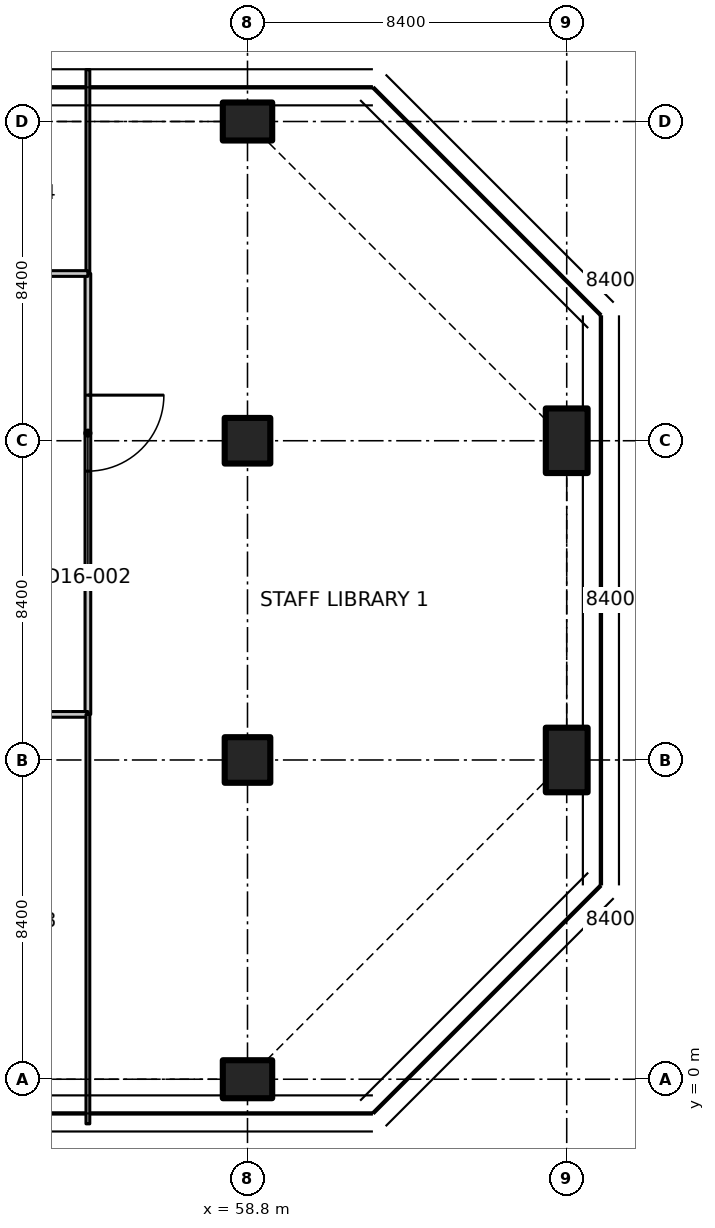
"""IFC4 building model, lengths in metres.
Left out: names, types, materials, properties, quantities, classifications, styles, units other than length and angle.
Written with IfcOpenShell. Run it as: python <this file> out.ifc"""

import sys

from ifc_helpers import new_model, si_unit, direction, frame, frame_2d, origin, origin_2d, place, context, subcontext, project, spatial, polyline, rectangle, outline, extrude, element, fill, save


model = new_model("IFC4")
c1 = context("Model", 3, precision=1e-05, world=origin(), true_north=direction((0.0, 1.0)))
c2 = subcontext(c1, "Body", "Model", "MODEL_VIEW")
j1 = project(units=[si_unit("LENGTHUNIT", "METRE"), si_unit("PLANEANGLEUNIT", "RADIAN")], contexts=[c1])
p1 = place(None, origin())
s1 = spatial("IfcSite", under=j1, at=p1, CompositionType="ELEMENT")
p2 = place(p1, origin())
s2 = spatial("IfcBuilding", under=s1, at=p2, CompositionType="ELEMENT")
p3 = place(p2, frame((0.0, 0.0, 127.7)))
s3 = spatial("IfcBuildingStorey", under=s2, at=p3, CompositionType="ELEMENT", Elevation=127.7)
p4 = place(p3, frame((58.8, 0.0, 0.0), z_axis=(0.0, 0.0, 1.0), x_axis=(0.0, 1.0, 0.0)))
e1 = element("IfcColumn", 1, at=p4, inside=s3, PredefinedType="COLUMN", context=c2, shape_type="SweptSolid", body=[
    extrude(rectangle(XDim=1.0, YDim=1.3, at=origin_2d()), origin(), (0.0, 0.0, 1.0), 3.35),
])
for number, where, z_axis, x_axis in (
    (2, (58.8, 8.4, 0.0), (0.0, 0.0, 1.0), (1.0, 0.0, 0.0)),
    (3, (58.8, 16.8, 0.0), (0.0, 0.0, 1.0), (1.0, 0.0, 0.0)),
):
    element("IfcColumn", number, at=place(p3, frame(where, z_axis=z_axis, x_axis=x_axis)), inside=s3, PredefinedType="COLUMN", context=c2, shape_type="SweptSolid", body=[
        extrude(rectangle(XDim=1.2, YDim=1.2, at=origin_2d()), origin(), (0.0, 0.0, 1.0), 3.35),
    ])
p5 = place(p3, frame((58.8, 25.2, 0.0), z_axis=(0.0, 0.0, 1.0), x_axis=(0.0, 1.0, 0.0)))
e4 = element("IfcColumn", 4, at=p5, inside=s3, PredefinedType="COLUMN", context=c2, shape_type="SweptSolid", body=[
    extrude(rectangle(XDim=1.0, YDim=1.3, at=origin_2d()), origin(), (0.0, 0.0, 1.0), 3.35),
])
for number, where, z_axis, x_axis in (
    (5, (67.2, 8.4, 0.0), (0.0, 0.0, 1.0), (1.0, 0.0, 0.0)),
    (6, (67.2, 16.8, 0.0), (0.0, 0.0, 1.0), (1.0, 0.0, 0.0)),
):
    element("IfcColumn", number, at=place(p3, frame(where, z_axis=z_axis, x_axis=x_axis)), inside=s3, PredefinedType="COLUMN", context=c2, shape_type="SweptSolid", body=[
        extrude(rectangle(XDim=1.1, YDim=1.7, at=origin_2d()), origin(), (0.0, 0.0, 1.0), 3.35),
    ])
p6 = place(p3, frame((54.6, 13.0, 0.0), z_axis=(0.0, 0.0, 1.0), x_axis=(0.0, -1.0, 0.0)))
e7 = element("IfcWall", 7, at=p6, inside=s3, PredefinedType="PARTITIONING", context=c2, shape_type="SweptSolid", body=[
    extrude(rectangle(XDim=3.4, YDim=0.15, at=frame_2d((1.7, 0.0))), origin(), (0.0, 0.0, 1.0), 3.33),
])
p7 = place(p3, frame((54.6, 9.6, 0.0), z_axis=(0.0, 0.0, 1.0), x_axis=(-1.0, 0.0, 0.0)))
e8 = element("IfcWall", 8, at=p7, inside=s3, PredefinedType="PARTITIONING", context=c2, shape_type="SweptSolid", body=[
    extrude(rectangle(XDim=4.2, YDim=0.15, at=frame_2d((2.1, 0.0))), origin(), (0.0, 0.0, 1.0), 3.33),
])
p8 = place(p7, frame((1.5, 0.0, 0.0)))
e9 = element("IfcOpeningElement", 9, at=p8, cuts=e8, PredefinedType="OPENING", context=c2, shape_type="SweptSolid", body=[
    extrude(rectangle(XDim=1.1, YDim=2.1, at=frame_2d((0.55, 1.05))), frame((0.0, 0.085, 0.0), z_axis=(0.0, -1.0, 0.0), x_axis=(1.0, 0.0, 0.0)), (0.0, 0.0, 1.0), 0.17),
])
p9 = place(p3, frame((54.6, 21.2, 0.0), z_axis=(0.0, 0.0, 1.0), x_axis=(0.0, -1.0, 0.0)))
e10 = element("IfcWall", 10, at=p9, inside=s3, PredefinedType="PARTITIONING", context=c2, shape_type="SweptSolid", body=[
    extrude(rectangle(XDim=8.2, YDim=0.15, at=frame_2d((4.1, 0.0))), origin(), (0.0, 0.0, 1.0), 3.33),
])
p10 = place(p9, frame((3.2, 0.0, 0.0)))
e11 = element("IfcOpeningElement", 11, at=p10, cuts=e10, PredefinedType="OPENING", context=c2, shape_type="SweptSolid", body=[
    extrude(rectangle(XDim=2.0, YDim=2.4, at=frame_2d((1.0, 1.2))), frame((0.0, 0.085, 0.0), z_axis=(0.0, -1.0, 0.0), x_axis=(1.0, 0.0, 0.0)), (0.0, 0.0, 1.0), 0.17),
])
p11 = place(p3, frame((54.6, -1.174, 0.0), z_axis=(0.0, 0.0, 1.0), x_axis=(0.0, 1.0, 0.0)))
e12 = element("IfcWall", 12, at=p11, inside=s3, PredefinedType="PARTITIONING", context=c2, shape_type="SweptSolid", body=[
    extrude(outline(polyline([(0.0, 0.0), (10.774, 0.0), (10.774, 3.33), (1.624, 3.33), (1.622, 2.98), (0.726, 2.98), (0.724, 3.33), (0.074, 3.33), (0.0, 3.33), (0.0, 0.0)])), frame((0.0, 0.05, 0.0), z_axis=(0.0, -1.0, 0.0), x_axis=(1.0, 0.0, 0.0)), (0.0, 0.0, 1.0), 0.1),
])
p12 = place(p3, frame((54.6, 21.2, 0.0), z_axis=(0.0, 0.0, 1.0), x_axis=(0.0, 1.0, 0.0)))
e13 = element("IfcWall", 13, at=p12, inside=s3, PredefinedType="PARTITIONING", context=c2, shape_type="SweptSolid", body=[
    extrude(outline(polyline([(0.0, 0.0), (5.365, 0.0), (5.365, 3.33), (5.1, 3.33), (4.45, 3.33), (4.448, 2.98), (3.552, 2.98), (3.55, 3.33), (0.0, 3.33), (0.0, 0.0)])), frame((0.0, 0.05, 0.0), z_axis=(0.0, -1.0, 0.0), x_axis=(1.0, 0.0, 0.0)), (0.0, 0.0, 1.0), 0.1),
])
p13 = place(p3, frame((51.0, 21.2, 0.0), z_axis=(0.0, 0.0, 1.0), x_axis=(1.0, 0.0, 0.0)))
e14 = element("IfcWall", 14, at=p13, inside=s3, PredefinedType="PARTITIONING", context=c2, shape_type="SweptSolid", body=[
    extrude(rectangle(XDim=3.6, YDim=0.15, at=frame_2d((1.8, 0.0))), origin(), (0.0, 0.0, 1.0), 3.33),
])
p14 = place(p13, frame((1.2, 0.0, 0.0)))
e15 = element("IfcOpeningElement", 15, at=p14, cuts=e14, PredefinedType="OPENING", context=c2, shape_type="SweptSolid", body=[
    extrude(rectangle(XDim=1.0, YDim=2.1, at=frame_2d((0.5, 1.05))), frame((0.0, 0.085, 0.0), z_axis=(0.0, -1.0, 0.0), x_axis=(1.0, 0.0, 0.0)), (0.0, 0.0, 1.0), 0.17),
])
p15 = place(p10, origin())
e16 = element("IfcDoor", 16, at=p15, inside=s3, OperationType="DOUBLE_DOOR_SINGLE_SWING", PredefinedType="DOOR", context=c2, shape_type="SweptSolid", body=[
    extrude(rectangle(XDim=2.0, YDim=2.4, at=frame_2d((1.0, 1.2))), frame((0.0, 0.025, 0.0), z_axis=(0.0, -1.0, 0.0), x_axis=(1.0, 0.0, 0.0)), (0.0, 0.0, 1.0), 0.05),
])
fill(e11, e16)
save(model, sys.argv[1])
